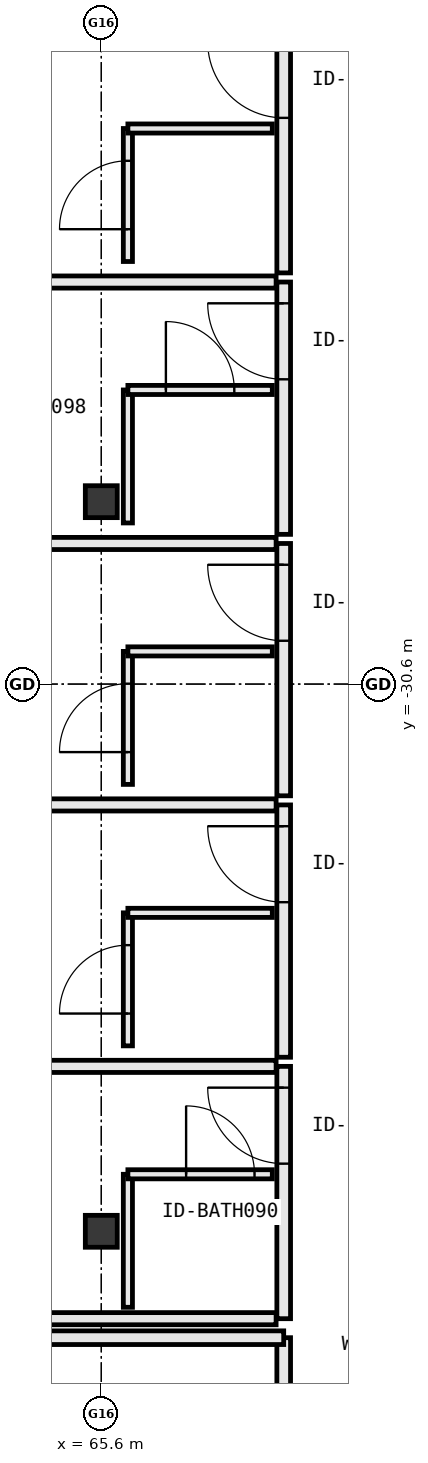
"""IFC4 building model, lengths in metres.
Left out: names, types, materials, properties, quantities, classifications, styles, units other than length and angle.
Written with IfcOpenShell. Run it as: python <this file> out.ifc"""

import sys

from ifc_helpers import new_model, si_unit, direction, frame, frame_2d, origin, origin_2d, place, context, subcontext, project, spatial, rectangle, extrude, element, fill, save


model = new_model("IFC4")
c1 = context("Model", 3, precision=1e-05, world=origin(), true_north=direction((0.0, 1.0)))
c2 = subcontext(c1, "Body", "Model", "MODEL_VIEW")
j1 = project(units=[si_unit("LENGTHUNIT", "METRE"), si_unit("PLANEANGLEUNIT", "RADIAN")], contexts=[c1])
p1 = place(None, origin())
s1 = spatial("IfcSite", under=j1, at=p1, CompositionType="ELEMENT")
p2 = place(p1, origin())
s2 = spatial("IfcBuilding", under=s1, at=p2, CompositionType="ELEMENT")
p3 = place(p2, frame((0.0, 0.0, 20.0)))
s3 = spatial("IfcBuildingStorey", under=s2, at=p3, CompositionType="ELEMENT", Elevation=20.0)
for number, where, z_axis, x_axis in (
    (1, (65.6, -37.8, 0.0), (0.0, 0.0, 1.0), (1.0, 0.0, 0.0)),
    (2, (65.6, -28.2, 0.0), (0.0, 0.0, 1.0), (1.0, 0.0, 0.0)),
):
    element("IfcColumn", number, at=place(p3, frame(where, z_axis=z_axis, x_axis=x_axis)), inside=s3, PredefinedType="COLUMN", context=c2, shape_type="SweptSolid", body=[
        extrude(rectangle(XDim=0.42, YDim=0.42, at=origin_2d()), origin(), (0.0, 0.0, 1.0), 3.8),
    ])
p4 = place(p3, frame((68.0, -47.05, 0.0), z_axis=(0.0, 0.0, 1.0), x_axis=(0.0, 1.0, 0.0)))
e3 = element("IfcWall", 3, at=p4, inside=s3, PredefinedType="PARTITIONING", context=c2, shape_type="SweptSolid", body=[
    extrude(rectangle(XDim=7.85, YDim=0.18, at=frame_2d((3.925, 0.0))), origin(), (0.0, 0.0, 1.0), 3.55),
])
p5 = place(p4, frame((3.4, 0.0, 0.0)))
e4 = element("IfcOpeningElement", 4, at=p5, cuts=e3, PredefinedType="OPENING", context=c2, shape_type="SweptSolid", body=[
    extrude(rectangle(XDim=1.05, YDim=2.2, at=frame_2d((0.525, 1.1))), frame((0.0, 0.102, 0.0), z_axis=(0.0, -1.0, 0.0), x_axis=(1.0, 0.0, 0.0)), (0.0, 0.0, 1.0), 0.204),
])
p6 = place(p3, frame((68.0, -39.2, 0.0), z_axis=(0.0, 0.0, 1.0), x_axis=(-1.0, 0.0, 0.0)))
e5 = element("IfcWall", 5, at=p6, inside=s3, PredefinedType="PARTITIONING", context=c2, shape_type="SweptSolid", body=[
    extrude(rectangle(XDim=6.85, YDim=0.18, at=frame_2d((3.425, 0.0))), origin(), (0.0, 0.0, 1.0), 3.55),
])
p7 = place(p3, frame((68.0, -38.95, 0.0), z_axis=(0.0, 0.0, 1.0), x_axis=(0.0, 1.0, 0.0)))
e6 = element("IfcWall", 6, at=p7, inside=s3, PredefinedType="PARTITIONING", context=c2, shape_type="SweptSolid", body=[
    extrude(rectangle(XDim=3.32, YDim=0.18, at=frame_2d((1.66, 0.0))), origin(), (0.0, 0.0, 1.0), 3.55),
])
p8 = place(p7, frame((2.04, 0.0, 0.0)))
e7 = element("IfcOpeningElement", 7, at=p8, cuts=e6, PredefinedType="OPENING", context=c2, shape_type="SweptSolid", body=[
    extrude(rectangle(XDim=1.0, YDim=2.2, at=frame_2d((0.5, 1.1))), frame((0.0, 0.102, 0.0), z_axis=(0.0, -1.0, 0.0), x_axis=(1.0, 0.0, 0.0)), (0.0, 0.0, 1.0), 0.204),
])
for number, where, z_axis, x_axis in (
    (8, (60.96, -38.95, 0.0), (0.0, 0.0, 1.0), (1.0, 0.0, 0.0)),
    (9, (60.96, -35.63, 0.0), (0.0, 0.0, 1.0), (1.0, 0.0, 0.0)),
):
    element("IfcWall", number, at=place(p3, frame(where, z_axis=z_axis, x_axis=x_axis)), inside=s3, PredefinedType="PARTITIONING", context=c2, shape_type="SweptSolid", body=[
        extrude(rectangle(XDim=6.94, YDim=0.16, at=frame_2d((3.47, 0.0))), origin(), (0.0, 0.0, 1.0), 3.55),
    ])
p9 = place(p3, frame((65.95, -38.8, 0.0), z_axis=(0.0, 0.0, 1.0), x_axis=(0.0, 1.0, 0.0)))
e10 = element("IfcWall", 10, at=p9, inside=s3, PredefinedType="PARTITIONING", context=c2, shape_type="SweptSolid", body=[
    extrude(rectangle(XDim=1.75, YDim=0.12, at=frame_2d((0.875, 0.0))), origin(), (0.0, 0.0, 1.0), 2.905),
])
p10 = place(p3, frame((65.95, -37.05, 0.0), z_axis=(0.0, 0.0, 1.0), x_axis=(1.0, 0.0, 0.0)))
e11 = element("IfcWall", 11, at=p10, inside=s3, PredefinedType="PARTITIONING", context=c2, shape_type="SweptSolid", body=[
    extrude(rectangle(XDim=1.9, YDim=0.12, at=frame_2d((0.95, 0.0))), origin(), (0.0, 0.0, 1.0), 3.55),
])
p11 = place(p10, frame((0.766, 0.0, 0.0)))
e12 = element("IfcOpeningElement", 12, at=p11, cuts=e11, PredefinedType="OPENING", context=c2, shape_type="SweptSolid", body=[
    extrude(rectangle(XDim=0.9, YDim=2.15, at=frame_2d((0.45, 1.075))), frame((0.0, 0.072, 0.0), z_axis=(0.0, -1.0, 0.0), x_axis=(1.0, 0.0, 0.0)), (0.0, 0.0, 1.0), 0.144),
])
p12 = place(p3, frame((68.0, -35.51, 0.0), z_axis=(0.0, 0.0, 1.0), x_axis=(0.0, 1.0, 0.0)))
e13 = element("IfcWall", 13, at=p12, inside=s3, PredefinedType="PARTITIONING", context=c2, shape_type="SweptSolid", body=[
    extrude(rectangle(XDim=3.32, YDim=0.18, at=frame_2d((1.66, 0.0))), origin(), (0.0, 0.0, 1.0), 3.55),
])
p13 = place(p12, frame((2.04, 0.0, 0.0)))
e14 = element("IfcOpeningElement", 14, at=p13, cuts=e13, PredefinedType="OPENING", context=c2, shape_type="SweptSolid", body=[
    extrude(rectangle(XDim=1.0, YDim=2.2, at=frame_2d((0.5, 1.1))), frame((0.0, 0.102, 0.0), z_axis=(0.0, -1.0, 0.0), x_axis=(1.0, 0.0, 0.0)), (0.0, 0.0, 1.0), 0.204),
])
p14 = place(p3, frame((60.96, -32.19, 0.0), z_axis=(0.0, 0.0, 1.0), x_axis=(1.0, 0.0, 0.0)))
e15 = element("IfcWall", 15, at=p14, inside=s3, PredefinedType="PARTITIONING", context=c2, shape_type="SweptSolid", body=[
    extrude(rectangle(XDim=6.94, YDim=0.16, at=frame_2d((3.47, 0.0))), origin(), (0.0, 0.0, 1.0), 3.55),
])
p15 = place(p3, frame((65.95, -35.36, 0.0), z_axis=(0.0, 0.0, 1.0), x_axis=(0.0, 1.0, 0.0)))
e16 = element("IfcWall", 16, at=p15, inside=s3, PredefinedType="PARTITIONING", context=c2, shape_type="SweptSolid", body=[
    extrude(rectangle(XDim=1.75, YDim=0.12, at=frame_2d((0.875, 0.0))), origin(), (0.0, 0.0, 1.0), 2.905),
])
p16 = place(p15, frame((0.425, 0.0, 0.0)))
e17 = element("IfcOpeningElement", 17, at=p16, cuts=e16, PredefinedType="OPENING", context=c2, shape_type="SweptSolid", body=[
    extrude(rectangle(XDim=0.9, YDim=2.15, at=frame_2d((0.45, 1.075))), frame((0.0, 0.072, 0.0), z_axis=(0.0, -1.0, 0.0), x_axis=(1.0, 0.0, 0.0)), (0.0, 0.0, 1.0), 0.144),
])
p17 = place(p3, frame((65.95, -33.61, 0.0), z_axis=(0.0, 0.0, 1.0), x_axis=(1.0, 0.0, 0.0)))
e18 = element("IfcWall", 18, at=p17, inside=s3, PredefinedType="PARTITIONING", context=c2, shape_type="SweptSolid", body=[
    extrude(rectangle(XDim=1.9, YDim=0.12, at=frame_2d((0.95, 0.0))), origin(), (0.0, 0.0, 1.0), 3.55),
])
p18 = place(p3, frame((68.0, -32.07, 0.0), z_axis=(0.0, 0.0, 1.0), x_axis=(0.0, 1.0, 0.0)))
e19 = element("IfcWall", 19, at=p18, inside=s3, PredefinedType="PARTITIONING", context=c2, shape_type="SweptSolid", body=[
    extrude(rectangle(XDim=3.32, YDim=0.18, at=frame_2d((1.66, 0.0))), origin(), (0.0, 0.0, 1.0), 3.55),
])
p19 = place(p18, frame((2.04, 0.0, 0.0)))
e20 = element("IfcOpeningElement", 20, at=p19, cuts=e19, PredefinedType="OPENING", context=c2, shape_type="SweptSolid", body=[
    extrude(rectangle(XDim=1.0, YDim=2.2, at=frame_2d((0.5, 1.1))), frame((0.0, 0.102, 0.0), z_axis=(0.0, -1.0, 0.0), x_axis=(1.0, 0.0, 0.0)), (0.0, 0.0, 1.0), 0.204),
])
p20 = place(p3, frame((60.96, -28.75, 0.0), z_axis=(0.0, 0.0, 1.0), x_axis=(1.0, 0.0, 0.0)))
e21 = element("IfcWall", 21, at=p20, inside=s3, PredefinedType="PARTITIONING", context=c2, shape_type="SweptSolid", body=[
    extrude(rectangle(XDim=6.94, YDim=0.16, at=frame_2d((3.47, 0.0))), origin(), (0.0, 0.0, 1.0), 3.55),
])
p21 = place(p3, frame((65.95, -31.92, 0.0), z_axis=(0.0, 0.0, 1.0), x_axis=(0.0, 1.0, 0.0)))
e22 = element("IfcWall", 22, at=p21, inside=s3, PredefinedType="PARTITIONING", context=c2, shape_type="SweptSolid", body=[
    extrude(rectangle(XDim=1.75, YDim=0.12, at=frame_2d((0.875, 0.0))), origin(), (0.0, 0.0, 1.0), 2.905),
])
p22 = place(p21, frame((0.425, 0.0, 0.0)))
e23 = element("IfcOpeningElement", 23, at=p22, cuts=e22, PredefinedType="OPENING", context=c2, shape_type="SweptSolid", body=[
    extrude(rectangle(XDim=0.9, YDim=2.15, at=frame_2d((0.45, 1.075))), frame((0.0, 0.072, 0.0), z_axis=(0.0, -1.0, 0.0), x_axis=(1.0, 0.0, 0.0)), (0.0, 0.0, 1.0), 0.144),
])
p23 = place(p3, frame((65.95, -30.17, 0.0), z_axis=(0.0, 0.0, 1.0), x_axis=(1.0, 0.0, 0.0)))
e24 = element("IfcWall", 24, at=p23, inside=s3, PredefinedType="PARTITIONING", context=c2, shape_type="SweptSolid", body=[
    extrude(rectangle(XDim=1.9, YDim=0.12, at=frame_2d((0.95, 0.0))), origin(), (0.0, 0.0, 1.0), 3.55),
])
p24 = place(p3, frame((68.0, -28.63, 0.0), z_axis=(0.0, 0.0, 1.0), x_axis=(0.0, 1.0, 0.0)))
e25 = element("IfcWall", 25, at=p24, inside=s3, PredefinedType="PARTITIONING", context=c2, shape_type="SweptSolid", body=[
    extrude(rectangle(XDim=3.32, YDim=0.18, at=frame_2d((1.66, 0.0))), origin(), (0.0, 0.0, 1.0), 3.55),
])
p25 = place(p24, frame((2.04, 0.0, 0.0)))
e26 = element("IfcOpeningElement", 26, at=p25, cuts=e25, PredefinedType="OPENING", context=c2, shape_type="SweptSolid", body=[
    extrude(rectangle(XDim=1.0, YDim=2.2, at=frame_2d((0.5, 1.1))), frame((0.0, 0.102, 0.0), z_axis=(0.0, -1.0, 0.0), x_axis=(1.0, 0.0, 0.0)), (0.0, 0.0, 1.0), 0.204),
])
p26 = place(p3, frame((60.96, -25.31, 0.0), z_axis=(0.0, 0.0, 1.0), x_axis=(1.0, 0.0, 0.0)))
e27 = element("IfcWall", 27, at=p26, inside=s3, PredefinedType="PARTITIONING", context=c2, shape_type="SweptSolid", body=[
    extrude(rectangle(XDim=6.94, YDim=0.16, at=frame_2d((3.47, 0.0))), origin(), (0.0, 0.0, 1.0), 3.55),
])
p27 = place(p3, frame((65.95, -28.48, 0.0), z_axis=(0.0, 0.0, 1.0), x_axis=(0.0, 1.0, 0.0)))
e28 = element("IfcWall", 28, at=p27, inside=s3, PredefinedType="PARTITIONING", context=c2, shape_type="SweptSolid", body=[
    extrude(rectangle(XDim=1.75, YDim=0.12, at=frame_2d((0.875, 0.0))), origin(), (0.0, 0.0, 1.0), 2.905),
])
p28 = place(p3, frame((65.95, -26.73, 0.0), z_axis=(0.0, 0.0, 1.0), x_axis=(1.0, 0.0, 0.0)))
e29 = element("IfcWall", 29, at=p28, inside=s3, PredefinedType="PARTITIONING", context=c2, shape_type="SweptSolid", body=[
    extrude(rectangle(XDim=1.9, YDim=0.12, at=frame_2d((0.95, 0.0))), origin(), (0.0, 0.0, 1.0), 3.55),
])
p29 = place(p28, frame((0.5, 0.0, 0.0)))
e30 = element("IfcOpeningElement", 30, at=p29, cuts=e29, PredefinedType="OPENING", context=c2, shape_type="SweptSolid", body=[
    extrude(rectangle(XDim=0.9, YDim=2.15, at=frame_2d((0.45, 1.075))), frame((0.0, 0.072, 0.0), z_axis=(0.0, -1.0, 0.0), x_axis=(1.0, 0.0, 0.0)), (0.0, 0.0, 1.0), 0.144),
])
p30 = place(p3, frame((68.0, -25.19, 0.0), z_axis=(0.0, 0.0, 1.0), x_axis=(0.0, 1.0, 0.0)))
e31 = element("IfcWall", 31, at=p30, inside=s3, PredefinedType="PARTITIONING", context=c2, shape_type="SweptSolid", body=[
    extrude(rectangle(XDim=3.32, YDim=0.18, at=frame_2d((1.66, 0.0))), origin(), (0.0, 0.0, 1.0), 3.55),
])
p31 = place(p30, frame((2.04, 0.0, 0.0)))
e32 = element("IfcOpeningElement", 32, at=p31, cuts=e31, PredefinedType="OPENING", context=c2, shape_type="SweptSolid", body=[
    extrude(rectangle(XDim=1.0, YDim=2.2, at=frame_2d((0.5, 1.1))), frame((0.0, 0.102, 0.0), z_axis=(0.0, -1.0, 0.0), x_axis=(1.0, 0.0, 0.0)), (0.0, 0.0, 1.0), 0.204),
])
p32 = place(p3, frame((65.95, -25.04, 0.0), z_axis=(0.0, 0.0, 1.0), x_axis=(0.0, 1.0, 0.0)))
e33 = element("IfcWall", 33, at=p32, inside=s3, PredefinedType="PARTITIONING", context=c2, shape_type="SweptSolid", body=[
    extrude(rectangle(XDim=1.75, YDim=0.12, at=frame_2d((0.875, 0.0))), origin(), (0.0, 0.0, 1.0), 2.905),
])
p33 = place(p32, frame((0.425, 0.0, 0.0)))
e34 = element("IfcOpeningElement", 34, at=p33, cuts=e33, PredefinedType="OPENING", context=c2, shape_type="SweptSolid", body=[
    extrude(rectangle(XDim=0.9, YDim=2.15, at=frame_2d((0.45, 1.075))), frame((0.0, 0.072, 0.0), z_axis=(0.0, -1.0, 0.0), x_axis=(1.0, 0.0, 0.0)), (0.0, 0.0, 1.0), 0.144),
])
p34 = place(p3, frame((65.95, -23.29, 0.0), z_axis=(0.0, 0.0, 1.0), x_axis=(1.0, 0.0, 0.0)))
e35 = element("IfcWall", 35, at=p34, inside=s3, PredefinedType="PARTITIONING", context=c2, shape_type="SweptSolid", body=[
    extrude(rectangle(XDim=1.9, YDim=0.12, at=frame_2d((0.95, 0.0))), origin(), (0.0, 0.0, 1.0), 2.685),
])
p35 = place(p8, origin())
e36 = element("IfcDoor", 36, at=p35, inside=s3, OperationType="SINGLE_SWING_RIGHT", PredefinedType="DOOR", context=c2, shape_type="SweptSolid", body=[
    extrude(rectangle(XDim=1.0, YDim=2.2, at=frame_2d((0.5, 1.1))), frame((0.0, 0.025, 0.0), z_axis=(0.0, -1.0, 0.0), x_axis=(1.0, 0.0, 0.0)), (0.0, 0.0, 1.0), 0.05),
])
fill(e7, e36)
p36 = place(p11, origin())
e37 = element("IfcDoor", 37, at=p36, inside=s3, OperationType="SINGLE_SWING_LEFT", PredefinedType="DOOR", context=c2, shape_type="SweptSolid", body=[
    extrude(rectangle(XDim=0.9, YDim=2.15, at=frame_2d((0.45, 1.075))), frame((0.0, 0.025, 0.0), z_axis=(0.0, -1.0, 0.0), x_axis=(1.0, 0.0, 0.0)), (0.0, 0.0, 1.0), 0.05),
])
fill(e12, e37)
p37 = place(p13, origin())
e38 = element("IfcDoor", 38, at=p37, inside=s3, OperationType="SINGLE_SWING_RIGHT", PredefinedType="DOOR", context=c2, shape_type="SweptSolid", body=[
    extrude(rectangle(XDim=1.0, YDim=2.2, at=frame_2d((0.5, 1.1))), frame((0.0, 0.025, 0.0), z_axis=(0.0, -1.0, 0.0), x_axis=(1.0, 0.0, 0.0)), (0.0, 0.0, 1.0), 0.05),
])
fill(e14, e38)
p38 = place(p16, origin())
e39 = element("IfcDoor", 39, at=p38, inside=s3, OperationType="SINGLE_SWING_LEFT", PredefinedType="DOOR", context=c2, shape_type="SweptSolid", body=[
    extrude(rectangle(XDim=0.9, YDim=2.15, at=frame_2d((0.45, 1.075))), frame((0.0, 0.025, 0.0), z_axis=(0.0, -1.0, 0.0), x_axis=(1.0, 0.0, 0.0)), (0.0, 0.0, 1.0), 0.05),
])
fill(e17, e39)
p39 = place(p19, origin())
e40 = element("IfcDoor", 40, at=p39, inside=s3, OperationType="SINGLE_SWING_RIGHT", PredefinedType="DOOR", context=c2, shape_type="SweptSolid", body=[
    extrude(rectangle(XDim=1.0, YDim=2.2, at=frame_2d((0.5, 1.1))), frame((0.0, 0.025, 0.0), z_axis=(0.0, -1.0, 0.0), x_axis=(1.0, 0.0, 0.0)), (0.0, 0.0, 1.0), 0.05),
])
fill(e20, e40)
p40 = place(p22, origin())
e41 = element("IfcDoor", 41, at=p40, inside=s3, OperationType="SINGLE_SWING_LEFT", PredefinedType="DOOR", context=c2, shape_type="SweptSolid", body=[
    extrude(rectangle(XDim=0.9, YDim=2.15, at=frame_2d((0.45, 1.075))), frame((0.0, 0.025, 0.0), z_axis=(0.0, -1.0, 0.0), x_axis=(1.0, 0.0, 0.0)), (0.0, 0.0, 1.0), 0.05),
])
fill(e23, e41)
p41 = place(p25, origin())
e42 = element("IfcDoor", 42, at=p41, inside=s3, OperationType="SINGLE_SWING_RIGHT", PredefinedType="DOOR", context=c2, shape_type="SweptSolid", body=[
    extrude(rectangle(XDim=1.0, YDim=2.2, at=frame_2d((0.5, 1.1))), frame((0.0, 0.025, 0.0), z_axis=(0.0, -1.0, 0.0), x_axis=(1.0, 0.0, 0.0)), (0.0, 0.0, 1.0), 0.05),
])
fill(e26, e42)
p42 = place(p29, origin())
e43 = element("IfcDoor", 43, at=p42, inside=s3, OperationType="SINGLE_SWING_LEFT", PredefinedType="DOOR", context=c2, shape_type="SweptSolid", body=[
    extrude(rectangle(XDim=0.9, YDim=2.15, at=frame_2d((0.45, 1.075))), frame((0.0, 0.025, 0.0), z_axis=(0.0, -1.0, 0.0), x_axis=(1.0, 0.0, 0.0)), (0.0, 0.0, 1.0), 0.05),
])
fill(e30, e43)
p43 = place(p31, origin())
e44 = element("IfcDoor", 44, at=p43, inside=s3, OperationType="SINGLE_SWING_RIGHT", PredefinedType="DOOR", context=c2, shape_type="SweptSolid", body=[
    extrude(rectangle(XDim=1.0, YDim=2.2, at=frame_2d((0.5, 1.1))), frame((0.0, 0.025, 0.0), z_axis=(0.0, -1.0, 0.0), x_axis=(1.0, 0.0, 0.0)), (0.0, 0.0, 1.0), 0.05),
])
fill(e32, e44)
p44 = place(p33, origin())
e45 = element("IfcDoor", 45, at=p44, inside=s3, OperationType="SINGLE_SWING_LEFT", PredefinedType="DOOR", context=c2, shape_type="SweptSolid", body=[
    extrude(rectangle(XDim=0.9, YDim=2.15, at=frame_2d((0.45, 1.075))), frame((0.0, 0.025, 0.0), z_axis=(0.0, -1.0, 0.0), x_axis=(1.0, 0.0, 0.0)), (0.0, 0.0, 1.0), 0.05),
])
fill(e34, e45)
save(model, sys.argv[1])
